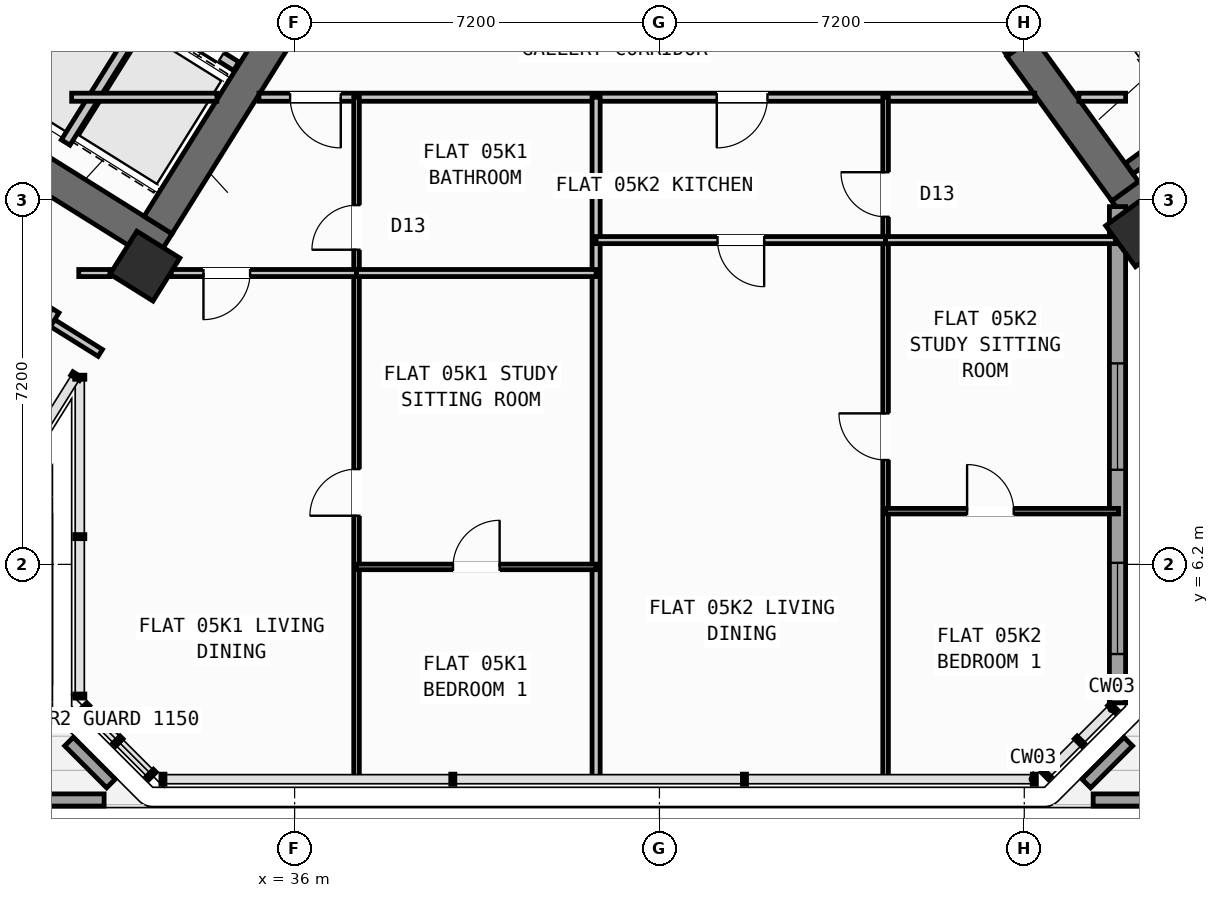
"""IFC4 building model, lengths in metres.
Left out: names, types, materials, properties, quantities, classifications, styles, units other than length and angle.
Written with IfcOpenShell. Run it as: python <this file> out.ifc"""

import sys

from ifc_helpers import new_model, si_unit, direction, frame, frame_2d, origin, origin_2d, place, context, subcontext, project, spatial, rectangle, hollow_rectangle, extrude, source, transform, mapped, element, fill, save


model = new_model("IFC4")
c1 = context("Model", 3, precision=1e-05, world=origin(), true_north=direction((0.0, 1.0)))
c2 = subcontext(c1, "Body", "Model", "MODEL_VIEW")
j1 = project(units=[si_unit("LENGTHUNIT", "METRE"), si_unit("PLANEANGLEUNIT", "RADIAN")], contexts=[c1])
p1 = place(None, origin())
s1 = spatial("IfcSite", under=j1, at=p1, CompositionType="ELEMENT")
p2 = place(p1, origin())
s2 = spatial("IfcBuilding", under=s1, at=p2, CompositionType="ELEMENT")
p3 = place(p2, frame((0.0, 0.0, 24.0)))
s3 = spatial("IfcBuildingStorey", under=s2, at=p3, CompositionType="ELEMENT", Elevation=24.0)
p4 = place(p3, frame((33.409, 12.45, 0.0), z_axis=(0.0, 0.0, 1.0), x_axis=(-0.848051132073, 0.529914405721, 0.0)))
e1 = element("IfcWall", 1, at=p4, inside=s3, PredefinedType="SHEAR", context=c2, shape_type="SweptSolid", body=[
    extrude(rectangle(XDim=13.24, YDim=0.65, at=frame_2d((6.62, 0.0))), origin(), (0.0, 0.0, 1.0), 3.35),
])
p5 = place(p3, frame((36.683, 18.304, 0.0), z_axis=(0.0, 0.0, 1.0), x_axis=(-0.529899109053, -0.848060690178, 0.0)))
e2 = element("IfcWall", 2, at=p5, inside=s3, PredefinedType="SHEAR", context=c2, shape_type="SweptSolid", body=[
    extrude(rectangle(XDim=6.375, YDim=0.65, at=frame_2d((3.188, 0.0))), origin(), (0.0, 0.0, 1.0), 3.35),
])
p6 = place(p3, frame((52.318, 13.11, 0.0), z_axis=(0.0, 0.0, 1.0), x_axis=(0.809019445368, 0.587781878776, 0.0)))
e3 = element("IfcWall", 3, at=p6, inside=s3, PredefinedType="SHEAR", context=c2, shape_type="SweptSolid", body=[
    extrude(rectangle(XDim=12.44, YDim=0.65, at=frame_2d((6.22, 0.0))), origin(), (0.0, 0.0, 1.0), 3.35),
])
p7 = place(p3, frame((52.39, 13.564, 0.0), z_axis=(0.0, 0.0, 1.0), x_axis=(-0.58779688989, 0.809008539037, 0.0)))
e4 = element("IfcWall", 4, at=p7, inside=s3, PredefinedType="SHEAR", context=c2, shape_type="SweptSolid", body=[
    extrude(rectangle(XDim=3.525, YDim=0.65, at=frame_2d((1.763, 0.0))), origin(), (0.0, 0.0, 1.0), 3.35),
])
m1 = source(origin(), c2, "Body", "SweptSolid", [
    extrude(hollow_rectangle(XDim=1.0, YDim=1.0, WallThickness=0.04, at=origin_2d()), origin(), (0.0, 0.0, 1.0), 3.6),
])
for number, where, z_axis, x_axis in (
    (5, (33.046, 12.087, 0.0), (0.0, 0.0, 1.0), (-0.848, 0.53, 0.0)),
    (6, (52.705, 12.773, 0.0), (0.0, 0.0, 1.0), (0.809, 0.588, 0.0)),
):
    element("IfcColumn", number, at=place(p3, frame(where, z_axis=z_axis, x_axis=x_axis)), inside=s3, PredefinedType="COLUMN", context=c2, shape_type="MappedRepresentation", body=[
        mapped(m1, transform((0.0, 0.0, 0.0), scale=1.0)),
    ])
p8 = place(p3, frame((32.24, 1.55, 0.0), z_axis=(0.0, 0.0, 1.0), x_axis=(-1.0, 0.0, 0.0)))
e7 = element("IfcWall", 7, at=p8, inside=s3, PredefinedType="PARAPET", context=c2, shape_type="SweptSolid", body=[
    extrude(rectangle(XDim=26.918, YDim=0.24, at=frame_2d((13.459, 0.0))), origin(), (0.0, 0.0, 1.0), 1.15),
])
for number, where, z_axis, x_axis in (
    (8, (31.548, 2.703, 0.0), (0.0, 0.0, 1.0), (0.707, -0.707, 0.0)),
    (9, (51.625, 1.875, 0.0), (0.0, 0.0, 1.0), (0.707, 0.707, 0.0)),
):
    element("IfcWall", number, at=place(p3, frame(where, z_axis=z_axis, x_axis=x_axis)), inside=s3, PredefinedType="PARAPET", context=c2, shape_type="SweptSolid", body=[
        extrude(rectangle(XDim=1.17, YDim=0.24, at=frame_2d((0.585, 0.0))), origin(), (0.0, 0.0, 1.0), 1.15),
    ])
p9 = place(p3, frame((66.678, 1.55, 0.0), z_axis=(0.0, 0.0, 1.0), x_axis=(-1.0, 0.0, 0.0)))
e10 = element("IfcWall", 10, at=p9, inside=s3, PredefinedType="PARAPET", context=c2, shape_type="SweptSolid", body=[
    extrude(rectangle(XDim=14.918, YDim=0.24, at=frame_2d((7.459, 0.0))), origin(), (0.0, 0.0, 1.0), 1.15),
])
p10 = place(p3, frame((56.581, 7.439, 0.0), z_axis=(0.0, 0.0, 1.0), x_axis=(-0.587785875463, 0.809016541614, 0.0)))
e11 = element("IfcWall", 11, at=p10, inside=s3, PredefinedType="STANDARD", context=c2, shape_type="SweptSolid", body=[
    extrude(rectangle(XDim=6.774, YDim=0.32, at=frame_2d((3.387, 0.0))), origin(), (0.0, 0.0, 1.0), 2.725),
])
p11 = place(p3, frame((52.24, 13.261, 0.0), z_axis=(0.0, 0.0, 1.0), x_axis=(0.0, -1.0, 0.0)))
e12 = element("IfcWall", 12, at=p11, inside=s3, PredefinedType="STANDARD", context=c2, shape_type="SweptSolid", body=[
    extrude(rectangle(XDim=9.795, YDim=0.32, at=frame_2d((4.897, 0.0))), origin(), (0.0, 0.0, 1.0), 3.35),
])
p12 = place(p11, frame((3.094, 0.0, 0.8)))
e13 = element("IfcOpeningElement", 13, at=p12, cuts=e12, PredefinedType="OPENING", context=c2, shape_type="SweptSolid", body=[
    extrude(rectangle(XDim=2.1, YDim=1.55, at=frame_2d((1.05, 0.775))), frame((0.0, 0.17, 0.0), z_axis=(0.0, -1.0, 0.0), x_axis=(1.0, 0.0, 0.0)), (0.0, 0.0, 1.0), 0.34),
])
p13 = place(p11, frame((7.03, 0.0, 0.85)))
e14 = element("IfcOpeningElement", 14, at=p13, cuts=e12, PredefinedType="OPENING", context=c2, shape_type="SweptSolid", body=[
    extrude(rectangle(XDim=1.8, YDim=1.5, at=frame_2d((0.9, 0.75))), frame((0.0, 0.17, 0.0), z_axis=(0.0, -1.0, 0.0), x_axis=(1.0, 0.0, 0.0)), (0.0, 0.0, 1.0), 0.34),
])
p14 = place(p3, frame((31.288, 18.256, 0.0), z_axis=(0.0, 0.0, 1.0), x_axis=(-0.529943379326, -0.848033026897, 0.0)))
e15 = element("IfcWall", 15, at=p14, inside=s3, PredefinedType="SHEAR", context=c2, shape_type="SweptSolid", body=[
    extrude(rectangle(XDim=3.16, YDim=0.26, at=frame_2d((1.58, 0.0))), origin(), (0.0, 0.0, 1.0), 3.35),
])
p15 = place(p3, frame((34.848, 16.031, 0.0), z_axis=(0.0, 0.0, 1.0), x_axis=(-0.848044042236, 0.529925751807, 0.0)))
e16 = element("IfcWall", 16, at=p15, inside=s3, PredefinedType="STANDARD", context=c2, shape_type="SweptSolid", body=[
    extrude(rectangle(XDim=4.198, YDim=0.2, at=frame_2d((2.099, 0.0))), origin(), (0.0, 0.0, 1.0), 3.34),
])
p16 = place(p15, frame((0.348, 0.0, 0.0)))
e17 = element("IfcOpeningElement", 17, at=p16, cuts=e16, PredefinedType="OPENING", context=c2, shape_type="SweptSolid", body=[
    extrude(rectangle(XDim=1.3, YDim=2.2, at=frame_2d((0.65, 1.1))), frame((0.0, 0.11, 0.0), z_axis=(0.0, -1.0, 0.0), x_axis=(1.0, 0.0, 0.0)), (0.0, 0.0, 1.0), 0.22),
])
p17 = place(p15, frame((2.423, 0.0, 0.0)))
e18 = element("IfcOpeningElement", 18, at=p17, cuts=e16, PredefinedType="OPENING", context=c2, shape_type="SweptSolid", body=[
    extrude(rectangle(XDim=1.45, YDim=2.25, at=frame_2d((0.725, 1.125))), frame((0.0, 0.11, 0.0), z_axis=(0.0, -1.0, 0.0), x_axis=(1.0, 0.0, 0.0)), (0.0, 0.0, 1.0), 0.22),
])
p18 = place(p3, frame((33.029, 17.003, 0.0), z_axis=(0.0, 0.0, 1.0), x_axis=(-0.529916267533, -0.848049968695, 0.0)))
e19 = element("IfcWall", 19, at=p18, inside=s3, PredefinedType="STANDARD", context=c2, shape_type="SweptSolid", body=[
    extrude(rectangle(XDim=2.92, YDim=0.2, at=frame_2d((1.46, 0.0))), origin(), (0.0, 0.0, 1.0), 3.34),
])
p19 = place(p3, frame((52.472, 14.013, 0.0), z_axis=(0.0, 0.0, 1.0), x_axis=(0.809028366311, 0.587769599847, 0.0)))
e20 = element("IfcWall", 20, at=p19, inside=s3, PredefinedType="SHEAR", context=c2, shape_type="SweptSolid", body=[
    extrude(rectangle(XDim=7.33, YDim=0.26, at=frame_2d((3.665, 0.0))), origin(), (0.0, 0.0, 1.0), 3.35),
])
p20 = place(p3, frame((32.164, 10.374, 0.0), z_axis=(0.0, 0.0, 1.0), x_axis=(-0.848044107957, 0.529925646633, 0.0)))
e21 = element("IfcWall", 21, at=p20, inside=s3, PredefinedType="PARTITIONING", context=c2, shape_type="SweptSolid", body=[
    extrude(rectangle(XDim=15.57, YDim=0.16, at=frame_2d((7.785, 0.0))), origin(), (0.0, 0.0, 1.0), 3.34),
])
p21 = place(p20, frame((10.83, 0.0, 0.0)))
e22 = element("IfcOpeningElement", 22, at=p21, cuts=e21, PredefinedType="OPENING", context=c2, shape_type="SweptSolid", body=[
    extrude(rectangle(XDim=1.0, YDim=2.1, at=frame_2d((0.5, 1.05))), frame((0.0, 0.09, 0.0), z_axis=(0.0, -1.0, 0.0), x_axis=(1.0, 0.0, 0.0)), (0.0, 0.0, 1.0), 0.18),
])
p22 = place(p3, frame((31.282, 11.208, 0.0), z_axis=(0.0, 0.0, 1.0), x_axis=(-0.529938869374, -0.84803584519, 0.0)))
e23 = element("IfcWall", 23, at=p22, inside=s3, PredefinedType="PARTITIONING", context=c2, shape_type="SweptSolid", body=[
    extrude(rectangle(XDim=5.48, YDim=0.16, at=frame_2d((2.74, 0.0))), origin(), (0.0, 0.0, 1.0), 3.34),
])
p23 = place(p3, frame((31.6, 15.42, 0.0), z_axis=(0.0, 0.0, 1.0), x_axis=(1.0, 0.0, 0.0)))
e24 = element("IfcWall", 24, at=p23, inside=s3, PredefinedType="PARTITIONING", context=c2, shape_type="SweptSolid", body=[
    extrude(rectangle(XDim=2.866, YDim=0.16, at=frame_2d((1.433, 0.0))), origin(), (0.0, 0.0, 1.0), 3.34),
])
p24 = place(p3, frame((35.296, 15.42, 0.0), z_axis=(0.0, 0.0, 1.0), x_axis=(1.0, 0.0, 0.0)))
e25 = element("IfcWall", 25, at=p24, inside=s3, PredefinedType="PARTITIONING", context=c2, shape_type="SweptSolid", body=[
    extrude(rectangle(XDim=15.311, YDim=0.16, at=frame_2d((7.655, 0.0))), origin(), (0.0, 0.0, 1.0), 3.34),
])
p25 = place(p24, frame((0.615, 0.0, 0.0)))
e26 = element("IfcOpeningElement", 26, at=p25, cuts=e25, PredefinedType="OPENING", context=c2, shape_type="SweptSolid", body=[
    extrude(rectangle(XDim=1.0, YDim=2.1, at=frame_2d((0.5, 1.05))), frame((0.0, 0.09, 0.0), z_axis=(0.0, -1.0, 0.0), x_axis=(1.0, 0.0, 0.0)), (0.0, 0.0, 1.0), 0.18),
])
p26 = place(p24, frame((9.035, 0.0, 0.0)))
e27 = element("IfcOpeningElement", 27, at=p26, cuts=e25, PredefinedType="OPENING", context=c2, shape_type="SweptSolid", body=[
    extrude(rectangle(XDim=1.0, YDim=2.1, at=frame_2d((0.5, 1.05))), frame((0.0, 0.09, 0.0), z_axis=(0.0, -1.0, 0.0), x_axis=(1.0, 0.0, 0.0)), (0.0, 0.0, 1.0), 0.18),
])
p27 = place(p3, frame((51.477, 15.42, 0.0), z_axis=(0.0, 0.0, 1.0), x_axis=(1.0, 0.0, 0.0)))
e28 = element("IfcWall", 28, at=p27, inside=s3, PredefinedType="PARTITIONING", context=c2, shape_type="SweptSolid", body=[
    extrude(rectangle(XDim=0.923, YDim=0.16, at=frame_2d((0.461, 0.0))), origin(), (0.0, 0.0, 1.0), 3.34),
])
p28 = place(p3, frame((50.119, 16.333, 0.0), z_axis=(0.0, 0.0, 1.0), x_axis=(-0.587749856981, 0.809042709391, 0.0)))
e29 = element("IfcWall", 29, at=p28, inside=s3, PredefinedType="STANDARD", context=c2, shape_type="SweptSolid", body=[
    extrude(rectangle(XDim=2.96, YDim=0.2, at=frame_2d((1.48, 0.0))), origin(), (0.0, 0.0, 1.0), 3.34),
])
p29 = place(p28, frame((0.53, 0.0, 0.0)))
e30 = element("IfcOpeningElement", 30, at=p29, cuts=e29, PredefinedType="OPENING", context=c2, shape_type="SweptSolid", body=[
    extrude(rectangle(XDim=1.5, YDim=2.15, at=frame_2d((0.75, 1.075))), frame((0.0, 0.11, 0.0), z_axis=(0.0, -1.0, 0.0), x_axis=(1.0, 0.0, 0.0)), (0.0, 0.0, 1.0), 0.22),
])
p30 = place(p3, frame((41.95, 1.96, 0.0), z_axis=(0.0, 0.0, 1.0), x_axis=(0.0, 1.0, 0.0)))
e31 = element("IfcWall", 31, at=p30, inside=s3, PredefinedType="PARTITIONING", context=c2, shape_type="SweptSolid", body=[
    extrude(rectangle(XDim=13.46, YDim=0.16, at=frame_2d((6.73, 0.0))), origin(), (0.0, 0.0, 1.0), 3.34),
])
p31 = place(p3, frame((37.222, 1.96, 0.0), z_axis=(0.0, 0.0, 1.0), x_axis=(0.0, 1.0, 0.0)))
e32 = element("IfcWall", 32, at=p31, inside=s3, PredefinedType="PARTITIONING", context=c2, shape_type="SweptSolid", body=[
    extrude(rectangle(XDim=13.46, YDim=0.11, at=frame_2d((6.73, 0.0))), origin(), (0.0, 0.0, 1.0), 3.34),
])
p32 = place(p31, frame((5.2, 0.0, 0.0)))
e33 = element("IfcOpeningElement", 33, at=p32, cuts=e32, PredefinedType="OPENING", context=c2, shape_type="SweptSolid", body=[
    extrude(rectangle(XDim=0.92, YDim=2.08, at=frame_2d((0.46, 1.04))), frame((0.0, 0.065, 0.0), z_axis=(0.0, -1.0, 0.0), x_axis=(1.0, 0.0, 0.0)), (0.0, 0.0, 1.0), 0.13),
])
p33 = place(p31, frame((10.45, 0.0, 0.0)))
e34 = element("IfcOpeningElement", 34, at=p33, cuts=e32, PredefinedType="OPENING", context=c2, shape_type="SweptSolid", body=[
    extrude(rectangle(XDim=0.88, YDim=2.08, at=frame_2d((0.44, 1.04))), frame((0.0, 0.065, 0.0), z_axis=(0.0, -1.0, 0.0), x_axis=(1.0, 0.0, 0.0)), (0.0, 0.0, 1.0), 0.13),
])
p34 = place(p3, frame((31.74, 11.95, 0.0), z_axis=(0.0, 0.0, 1.0), x_axis=(1.0, 0.0, 0.0)))
e35 = element("IfcWall", 35, at=p34, inside=s3, PredefinedType="PLUMBINGWALL", context=c2, shape_type="SweptSolid", body=[
    extrude(rectangle(XDim=0.617, YDim=0.14, at=frame_2d((0.309, 0.0))), origin(), (0.0, 0.0, 1.0), 3.34),
])
p35 = place(p3, frame((33.564, 11.95, 0.0), z_axis=(0.0, 0.0, 1.0), x_axis=(1.0, 0.0, 0.0)))
e36 = element("IfcWall", 36, at=p35, inside=s3, PredefinedType="PLUMBINGWALL", context=c2, shape_type="SweptSolid", body=[
    extrude(rectangle(XDim=3.657, YDim=0.14, at=frame_2d((1.829, 0.0))), origin(), (0.0, 0.0, 1.0), 2.525),
])
p36 = place(p35, frame((0.637, 0.0, 0.0)))
e37 = element("IfcOpeningElement", 37, at=p36, cuts=e36, PredefinedType="OPENING", context=c2, shape_type="SweptSolid", body=[
    extrude(rectangle(XDim=0.92, YDim=2.08, at=frame_2d((0.46, 1.04))), frame((0.0, 0.08, 0.0), z_axis=(0.0, -1.0, 0.0), x_axis=(1.0, 0.0, 0.0)), (0.0, 0.0, 1.0), 0.16),
])
p37 = place(p3, frame((37.222, 11.95, 0.0), z_axis=(0.0, 0.0, 1.0), x_axis=(1.0, 0.0, 0.0)))
e38 = element("IfcWall", 38, at=p37, inside=s3, PredefinedType="PLUMBINGWALL", context=c2, shape_type="SweptSolid", body=[
    extrude(rectangle(XDim=4.728, YDim=0.14, at=frame_2d((2.364, 0.0))), origin(), (0.0, 0.0, 1.0), 2.525),
])
p38 = place(p3, frame((37.222, 6.15, 0.0), z_axis=(0.0, 0.0, 1.0), x_axis=(1.0, 0.0, 0.0)))
e39 = element("IfcWall", 39, at=p38, inside=s3, PredefinedType="PARTITIONING", context=c2, shape_type="SweptSolid", body=[
    extrude(rectangle(XDim=4.728, YDim=0.11, at=frame_2d((2.364, 0.0))), origin(), (0.0, 0.0, 1.0), 3.34),
])
p39 = place(p38, frame((1.904, 0.0, 0.0)))
e40 = element("IfcOpeningElement", 40, at=p39, cuts=e39, PredefinedType="OPENING", context=c2, shape_type="SweptSolid", body=[
    extrude(rectangle(XDim=0.92, YDim=2.08, at=frame_2d((0.46, 1.04))), frame((0.0, 0.065, 0.0), z_axis=(0.0, -1.0, 0.0), x_axis=(1.0, 0.0, 0.0)), (0.0, 0.0, 1.0), 0.13),
])
p40 = place(p3, frame((47.663, 1.96, 0.0), z_axis=(0.0, 0.0, 1.0), x_axis=(0.0, 1.0, 0.0)))
e41 = element("IfcWall", 41, at=p40, inside=s3, PredefinedType="PARTITIONING", context=c2, shape_type="SweptSolid", body=[
    extrude(rectangle(XDim=13.46, YDim=0.11, at=frame_2d((6.73, 0.0))), origin(), (0.0, 0.0, 1.0), 3.34),
])
p41 = place(p40, frame((6.3, 0.0, 0.0)))
e42 = element("IfcOpeningElement", 42, at=p41, cuts=e41, PredefinedType="OPENING", context=c2, shape_type="SweptSolid", body=[
    extrude(rectangle(XDim=0.92, YDim=2.08, at=frame_2d((0.46, 1.04))), frame((0.0, 0.065, 0.0), z_axis=(0.0, -1.0, 0.0), x_axis=(1.0, 0.0, 0.0)), (0.0, 0.0, 1.0), 0.13),
])
p42 = place(p40, frame((11.1, 0.0, 0.0)))
e43 = element("IfcOpeningElement", 43, at=p42, cuts=e41, PredefinedType="OPENING", context=c2, shape_type="SweptSolid", body=[
    extrude(rectangle(XDim=0.88, YDim=2.08, at=frame_2d((0.44, 1.04))), frame((0.0, 0.065, 0.0), z_axis=(0.0, -1.0, 0.0), x_axis=(1.0, 0.0, 0.0)), (0.0, 0.0, 1.0), 0.13),
])
p43 = place(p3, frame((41.95, 12.6, 0.0), z_axis=(0.0, 0.0, 1.0), x_axis=(1.0, 0.0, 0.0)))
e44 = element("IfcWall", 44, at=p43, inside=s3, PredefinedType="PLUMBINGWALL", context=c2, shape_type="SweptSolid", body=[
    extrude(rectangle(XDim=5.713, YDim=0.14, at=frame_2d((2.856, 0.0))), origin(), (0.0, 0.0, 1.0), 2.525),
])
p44 = place(p43, frame((2.396, 0.0, 0.0)))
e45 = element("IfcOpeningElement", 45, at=p44, cuts=e44, PredefinedType="OPENING", context=c2, shape_type="SweptSolid", body=[
    extrude(rectangle(XDim=0.92, YDim=2.08, at=frame_2d((0.46, 1.04))), frame((0.0, 0.08, 0.0), z_axis=(0.0, -1.0, 0.0), x_axis=(1.0, 0.0, 0.0)), (0.0, 0.0, 1.0), 0.16),
])
p45 = place(p3, frame((47.663, 12.6, 0.0), z_axis=(0.0, 0.0, 1.0), x_axis=(1.0, 0.0, 0.0)))
e46 = element("IfcWall", 46, at=p45, inside=s3, PredefinedType="PLUMBINGWALL", context=c2, shape_type="SweptSolid", body=[
    extrude(rectangle(XDim=4.535, YDim=0.14, at=frame_2d((2.268, 0.0))), origin(), (0.0, 0.0, 1.0), 2.525),
])
p46 = place(p3, frame((47.663, 7.25, 0.0), z_axis=(0.0, 0.0, 1.0), x_axis=(1.0, 0.0, 0.0)))
e47 = element("IfcWall", 47, at=p46, inside=s3, PredefinedType="PARTITIONING", context=c2, shape_type="SweptSolid", body=[
    extrude(rectangle(XDim=4.597, YDim=0.11, at=frame_2d((2.298, 0.0))), origin(), (0.0, 0.0, 1.0), 3.34),
])
p47 = place(p46, frame((1.608, 0.0, 0.0)))
e48 = element("IfcOpeningElement", 48, at=p47, cuts=e47, PredefinedType="OPENING", context=c2, shape_type="SweptSolid", body=[
    extrude(rectangle(XDim=0.92, YDim=2.08, at=frame_2d((0.46, 1.04))), frame((0.0, 0.065, 0.0), z_axis=(0.0, -1.0, 0.0), x_axis=(1.0, 0.0, 0.0)), (0.0, 0.0, 1.0), 0.13),
])
m2 = source(origin(), c2, "Body", "SweptSolid", [
    extrude(rectangle(XDim=2.1, YDim=1.55, at=frame_2d((1.05, 0.775))), frame((0.0, 0.03, 0.0), z_axis=(0.0, -1.0, 0.0), x_axis=(1.0, 0.0, 0.0)), (0.0, 0.0, 1.0), 0.06),
])
p48 = place(p12, origin())
e49 = element("IfcWindow", 49, at=p48, inside=s3, PartitioningType="SINGLE_PANEL", PredefinedType="WINDOW", context=c2, shape_type="MappedRepresentation", body=[
    mapped(m2, transform((0.0, 0.0, 0.0), scale=1.0)),
])
fill(e13, e49)
m3 = source(origin(), c2, "Body", "SweptSolid", [
    extrude(rectangle(XDim=1.8, YDim=1.5, at=frame_2d((0.9, 0.75))), frame((0.0, 0.03, 0.0), z_axis=(0.0, -1.0, 0.0), x_axis=(1.0, 0.0, 0.0)), (0.0, 0.0, 1.0), 0.06),
])
p49 = place(p13, origin())
e50 = element("IfcWindow", 50, at=p49, inside=s3, PartitioningType="SINGLE_PANEL", PredefinedType="WINDOW", context=c2, shape_type="MappedRepresentation", body=[
    mapped(m3, transform((0.0, 0.0, 0.0), scale=1.0)),
])
fill(e14, e50)
m4 = source(origin(), c2, "Body", "SweptSolid", [
    extrude(rectangle(XDim=1.3, YDim=2.2, at=frame_2d((0.65, 1.1))), frame((0.0, 0.025, 0.0), z_axis=(0.0, -1.0, 0.0), x_axis=(1.0, 0.0, 0.0)), (0.0, 0.0, 1.0), 0.05),
])
p50 = place(p16, origin())
e51 = element("IfcDoor", 51, at=p50, inside=s3, OperationType="DOUBLE_DOOR_SLIDING", PredefinedType="DOOR", context=c2, shape_type="MappedRepresentation", body=[
    mapped(m4, transform((0.0, 0.0, 0.0), scale=1.0)),
])
fill(e17, e51)
m5 = source(origin(), c2, "Body", "SweptSolid", [
    extrude(rectangle(XDim=0.92, YDim=2.08, at=frame_2d((0.46, 1.04))), frame((0.0, 0.025, 0.0), z_axis=(0.0, -1.0, 0.0), x_axis=(1.0, 0.0, 0.0)), (0.0, 0.0, 1.0), 0.05),
])
p51 = place(p32, origin())
e52 = element("IfcDoor", 52, at=p51, inside=s3, OperationType="SINGLE_SWING_LEFT", PredefinedType="DOOR", context=c2, shape_type="MappedRepresentation", body=[
    mapped(m5, transform((0.0, 0.0, 0.0), scale=1.0)),
])
fill(e33, e52)
p52 = place(p39, origin())
e53 = element("IfcDoor", 53, at=p52, inside=s3, OperationType="SINGLE_SWING_RIGHT", PredefinedType="DOOR", context=c2, shape_type="MappedRepresentation", body=[
    mapped(m5, transform((0.0, 0.0, 0.0), scale=1.0)),
])
fill(e40, e53)
m6 = source(origin(), c2, "Body", "SweptSolid", [
    extrude(rectangle(XDim=1.0, YDim=2.1, at=frame_2d((0.5, 1.05))), frame((0.0, 0.025, 0.0), z_axis=(0.0, -1.0, 0.0), x_axis=(1.0, 0.0, 0.0)), (0.0, 0.0, 1.0), 0.05),
])
p53 = place(p25, frame((1.0, 0.0, 0.0), z_axis=(0.0, 0.0, 1.0), x_axis=(-1.0, 0.0, 0.0)))
e54 = element("IfcDoor", 54, at=p53, inside=s3, OperationType="SINGLE_SWING_LEFT", PredefinedType="DOOR", context=c2, shape_type="MappedRepresentation", body=[
    mapped(m6, transform((0.0, 0.0, 0.0), scale=1.0)),
])
fill(e26, e54)
p54 = place(p36, frame((0.92, 0.0, 0.0), z_axis=(0.0, 0.0, 1.0), x_axis=(-1.0, 0.0, 0.0)))
e55 = element("IfcDoor", 55, at=p54, inside=s3, OperationType="SINGLE_SWING_RIGHT", PredefinedType="DOOR", context=c2, shape_type="MappedRepresentation", body=[
    mapped(m5, transform((0.0, 0.0, 0.0), scale=1.0)),
])
fill(e37, e55)
m7 = source(origin(), c2, "Body", "SweptSolid", [
    extrude(rectangle(XDim=0.88, YDim=2.08, at=frame_2d((0.44, 1.04))), frame((0.0, 0.025, 0.0), z_axis=(0.0, -1.0, 0.0), x_axis=(1.0, 0.0, 0.0)), (0.0, 0.0, 1.0), 0.05),
])
p55 = place(p33, origin())
e56 = element("IfcDoor", 56, at=p55, inside=s3, OperationType="SINGLE_SWING_LEFT", PredefinedType="DOOR", context=c2, shape_type="MappedRepresentation", body=[
    mapped(m7, transform((0.0, 0.0, 0.0), scale=1.0)),
])
fill(e34, e56)
p56 = place(p41, origin())
e57 = element("IfcDoor", 57, at=p56, inside=s3, OperationType="SINGLE_SWING_RIGHT", PredefinedType="DOOR", context=c2, shape_type="MappedRepresentation", body=[
    mapped(m5, transform((0.0, 0.0, 0.0), scale=1.0)),
])
fill(e42, e57)
p57 = place(p47, origin())
e58 = element("IfcDoor", 58, at=p57, inside=s3, OperationType="SINGLE_SWING_LEFT", PredefinedType="DOOR", context=c2, shape_type="MappedRepresentation", body=[
    mapped(m5, transform((0.0, 0.0, 0.0), scale=1.0)),
])
fill(e48, e58)
p58 = place(p26, frame((1.0, 0.0, 0.0), z_axis=(0.0, 0.0, 1.0), x_axis=(-1.0, 0.0, 0.0)))
e59 = element("IfcDoor", 59, at=p58, inside=s3, OperationType="SINGLE_SWING_RIGHT", PredefinedType="DOOR", context=c2, shape_type="MappedRepresentation", body=[
    mapped(m6, transform((0.0, 0.0, 0.0), scale=1.0)),
])
fill(e27, e59)
p59 = place(p44, frame((0.92, 0.0, 0.0), z_axis=(0.0, 0.0, 1.0), x_axis=(-1.0, 0.0, 0.0)))
e60 = element("IfcDoor", 60, at=p59, inside=s3, OperationType="SINGLE_SWING_LEFT", PredefinedType="DOOR", context=c2, shape_type="MappedRepresentation", body=[
    mapped(m5, transform((0.0, 0.0, 0.0), scale=1.0)),
])
fill(e45, e60)
p60 = place(p42, origin())
e61 = element("IfcDoor", 61, at=p60, inside=s3, OperationType="SINGLE_SWING_RIGHT", PredefinedType="DOOR", context=c2, shape_type="MappedRepresentation", body=[
    mapped(m7, transform((0.0, 0.0, 0.0), scale=1.0)),
])
fill(e43, e61)
save(model, sys.argv[1])
